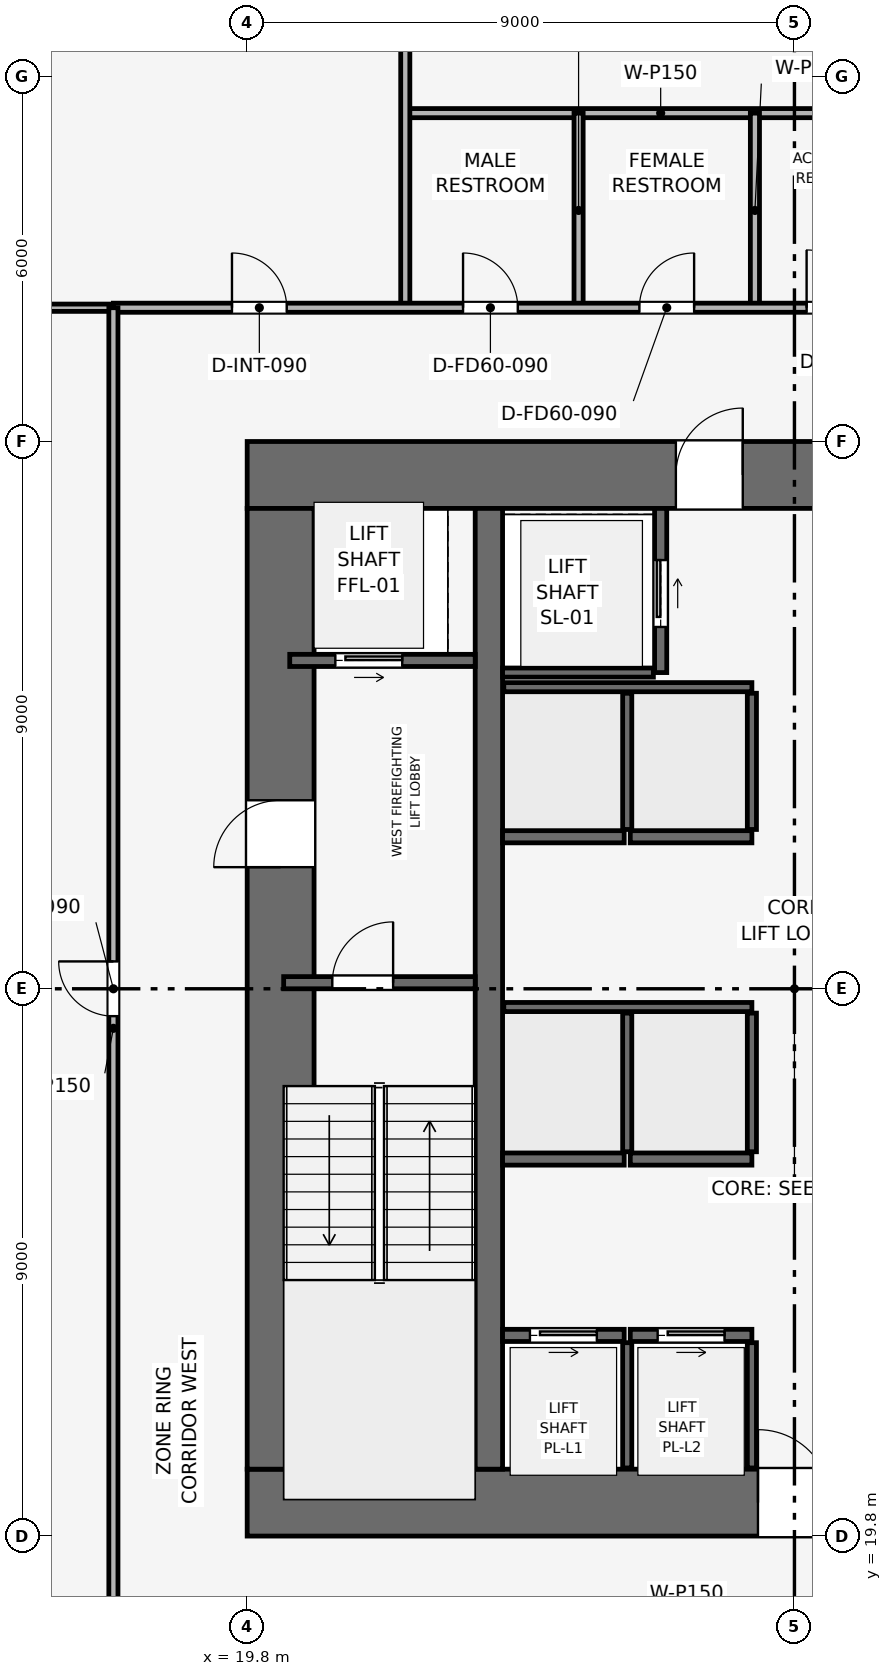
"""IFC4 building model, lengths in metres.
Left out: names, types, materials, properties, quantities, classifications, styles, units other than length and angle.
Written with IfcOpenShell. Run it as: python <this file> out.ifc"""

import sys

from ifc_helpers import new_model, si_unit, direction, frame, frame_2d, origin, place, context, subcontext, project, spatial, rectangle, extrude, element, fill, save


model = new_model("IFC4")
c1 = context("Model", 3, precision=1e-05, world=origin(), true_north=direction((0.0, 1.0)))
c2 = subcontext(c1, "Body", "Model", "MODEL_VIEW")
j1 = project(units=[si_unit("LENGTHUNIT", "METRE"), si_unit("PLANEANGLEUNIT", "RADIAN")], contexts=[c1])
p1 = place(None, origin())
s1 = spatial("IfcSite", under=j1, at=p1, CompositionType="ELEMENT")
p2 = place(p1, origin())
s2 = spatial("IfcBuilding", under=s1, at=p2, CompositionType="ELEMENT")
p3 = place(p2, frame((0.0, 0.0, 41.7)))
s3 = spatial("IfcBuildingStorey", under=s2, at=p3, CompositionType="ELEMENT", Elevation=41.7)
p4 = place(p3, frame((19.8, 20.35, 0.0), z_axis=(0.0, 0.0, 1.0), x_axis=(1.0, 0.0, 0.0)))
e1 = element("IfcWall", 1, at=p4, inside=s3, PredefinedType="SHEAR", context=c2, shape_type="SweptSolid", body=[
    extrude(rectangle(XDim=18.0, YDim=1.1, at=frame_2d((9.0, 0.0))), origin(), (0.0, 0.0, 1.0), 3.9),
])
p5 = place(p4, frame((8.4, 0.0, 0.0)))
e2 = element("IfcOpeningElement", 2, at=p5, cuts=e1, PredefinedType="OPENING", context=c2, shape_type="SweptSolid", body=[
    extrude(rectangle(XDim=1.2, YDim=2.2, at=frame_2d((0.6, 1.1))), frame((0.0, 0.56, 0.0), z_axis=(0.0, -1.0, 0.0), x_axis=(1.0, 0.0, 0.0)), (0.0, 0.0, 1.0), 1.12),
])
p6 = place(p3, frame((19.8, 37.25, 0.0), z_axis=(0.0, 0.0, 1.0), x_axis=(1.0, 0.0, 0.0)))
e3 = element("IfcWall", 3, at=p6, inside=s3, PredefinedType="SHEAR", context=c2, shape_type="SweptSolid", body=[
    extrude(rectangle(XDim=18.0, YDim=1.1, at=frame_2d((9.0, 0.0))), origin(), (0.0, 0.0, 1.0), 3.9),
])
p7 = place(p6, frame((7.05, 0.0, 0.0)))
e4 = element("IfcOpeningElement", 4, at=p7, cuts=e3, PredefinedType="OPENING", context=c2, shape_type="SweptSolid", body=[
    extrude(rectangle(XDim=1.1, YDim=2.15, at=frame_2d((0.55, 1.075))), frame((0.0, 0.56, 0.0), z_axis=(0.0, -1.0, 0.0), x_axis=(1.0, 0.0, 0.0)), (0.0, 0.0, 1.0), 1.12),
])
p8 = place(p3, frame((20.35, 20.9, 0.0), z_axis=(0.0, 0.0, 1.0), x_axis=(0.0, 1.0, 0.0)))
e5 = element("IfcWall", 5, at=p8, inside=s3, PredefinedType="SHEAR", context=c2, shape_type="SweptSolid", body=[
    extrude(rectangle(XDim=15.8, YDim=1.1, at=frame_2d((7.9, 0.0))), origin(), (0.0, 0.0, 1.0), 3.9),
])
p9 = place(p8, frame((9.9, 0.0, 0.0)))
e6 = element("IfcOpeningElement", 6, at=p9, cuts=e5, PredefinedType="OPENING", context=c2, shape_type="SweptSolid", body=[
    extrude(rectangle(XDim=1.1, YDim=2.15, at=frame_2d((0.55, 1.075))), frame((0.0, 0.56, 0.0), z_axis=(0.0, -1.0, 0.0), x_axis=(1.0, 0.0, 0.0)), (0.0, 0.0, 1.0), 1.12),
])
p10 = place(p3, frame((23.775, 20.9, 0.0), z_axis=(0.0, 0.0, 1.0), x_axis=(0.0, 1.0, 0.0)))
e7 = element("IfcWall", 7, at=p10, inside=s3, PredefinedType="SHEAR", context=c2, shape_type="SweptSolid", body=[
    extrude(rectangle(XDim=15.8, YDim=0.45, at=frame_2d((7.9, 0.0))), origin(), (0.0, 0.0, 1.0), 3.9),
])
p11 = place(p3, frame((20.4, 28.9, 0.0), z_axis=(0.0, 0.0, 1.0), x_axis=(1.0, 0.0, 0.0)))
e8 = element("IfcWall", 8, at=p11, inside=s3, PredefinedType="SHEAR", context=c2, shape_type="SweptSolid", body=[
    extrude(rectangle(XDim=3.15, YDim=0.2, at=frame_2d((1.575, 0.0))), origin(), (0.0, 0.0, 1.0), 3.65),
])
p12 = place(p11, frame((0.8, 0.0, 0.0)))
e9 = element("IfcOpeningElement", 9, at=p12, cuts=e8, PredefinedType="OPENING", context=c2, shape_type="SweptSolid", body=[
    extrude(rectangle(XDim=1.0, YDim=2.1, at=frame_2d((0.5, 1.05))), frame((0.0, 0.11, 0.0), z_axis=(0.0, -1.0, 0.0), x_axis=(1.0, 0.0, 0.0)), (0.0, 0.0, 1.0), 0.22),
])
p13 = place(p3, frame((20.5, 34.2, 0.0), z_axis=(0.0, 0.0, 1.0), x_axis=(1.0, 0.0, 0.0)))
e10 = element("IfcWall", 10, at=p13, inside=s3, PredefinedType="SHEAR", context=c2, shape_type="SweptSolid", body=[
    extrude(rectangle(XDim=3.05, YDim=0.2, at=frame_2d((1.525, 0.0))), origin(), (0.0, 0.0, 1.0), 3.65),
])
p14 = place(p13, frame((0.75, 0.0, 0.0)))
e11 = element("IfcOpeningElement", 11, at=p14, cuts=e10, PredefinedType="OPENING", context=c2, shape_type="SweptSolid", body=[
    extrude(rectangle(XDim=1.1, YDim=2.15, at=frame_2d((0.55, 1.075))), frame((0.0, 0.11, 0.0), z_axis=(0.0, -1.0, 0.0), x_axis=(1.0, 0.0, 0.0)), (0.0, 0.0, 1.0), 0.22),
])
p15 = place(p3, frame((26.6, 34.0, 0.0), z_axis=(0.0, 0.0, 1.0), x_axis=(0.0, 1.0, 0.0)))
e12 = element("IfcWall", 12, at=p15, inside=s3, PredefinedType="SHEAR", context=c2, shape_type="SweptSolid", body=[
    extrude(rectangle(XDim=2.7, YDim=0.2, at=frame_2d((1.35, 0.0))), origin(), (0.0, 0.0, 1.0), 3.65),
])
p16 = place(p15, frame((0.75, 0.0, 0.0)))
e13 = element("IfcOpeningElement", 13, at=p16, cuts=e12, PredefinedType="OPENING", context=c2, shape_type="SweptSolid", body=[
    extrude(rectangle(XDim=1.1, YDim=2.15, at=frame_2d((0.55, 1.075))), frame((0.0, 0.11, 0.0), z_axis=(0.0, -1.0, 0.0), x_axis=(1.0, 0.0, 0.0)), (0.0, 0.0, 1.0), 0.22),
])
p17 = place(p3, frame((24.0, 34.0, 0.0), z_axis=(0.0, 0.0, 1.0), x_axis=(1.0, 0.0, 0.0)))
e14 = element("IfcWall", 14, at=p17, inside=s3, PredefinedType="SHEAR", context=c2, shape_type="SweptSolid", body=[
    extrude(rectangle(XDim=2.48, YDim=0.15, at=frame_2d((1.24, 0.0))), origin(), (0.0, 0.0, 1.0), 3.65),
])
p18 = place(p3, frame((24.0, 23.1, 0.0), z_axis=(0.0, 0.0, 1.0), x_axis=(1.0, 0.0, 0.0)))
e15 = element("IfcWall", 15, at=p18, inside=s3, PredefinedType="SHEAR", context=c2, shape_type="SweptSolid", body=[
    extrude(rectangle(XDim=2.0, YDim=0.2, at=frame_2d((1.0, 0.0))), origin(), (0.0, 0.0, 1.0), 3.65),
])
p19 = place(p18, frame((0.45, 0.0, 0.0)))
e16 = element("IfcOpeningElement", 16, at=p19, cuts=e15, PredefinedType="OPENING", context=c2, shape_type="SweptSolid", body=[
    extrude(rectangle(XDim=1.1, YDim=2.15, at=frame_2d((0.55, 1.075))), frame((0.0, 0.11, 0.0), z_axis=(0.0, -1.0, 0.0), x_axis=(1.0, 0.0, 0.0)), (0.0, 0.0, 1.0), 0.22),
])
p20 = place(p3, frame((26.1, 23.1, 0.0), z_axis=(0.0, 0.0, 1.0), x_axis=(1.0, 0.0, 0.0)))
e17 = element("IfcWall", 17, at=p20, inside=s3, PredefinedType="SHEAR", context=c2, shape_type="SweptSolid", body=[
    extrude(rectangle(XDim=2.0, YDim=0.2, at=frame_2d((1.0, 0.0))), origin(), (0.0, 0.0, 1.0), 3.65),
])
p21 = place(p20, frame((0.45, 0.0, 0.0)))
e18 = element("IfcOpeningElement", 18, at=p21, cuts=e17, PredefinedType="OPENING", context=c2, shape_type="SweptSolid", body=[
    extrude(rectangle(XDim=1.1, YDim=2.15, at=frame_2d((0.55, 1.075))), frame((0.0, 0.11, 0.0), z_axis=(0.0, -1.0, 0.0), x_axis=(1.0, 0.0, 0.0)), (0.0, 0.0, 1.0), 0.22),
])
for number, where, z_axis, x_axis in (
    (19, (24.0, 26.0, 0.0), (0.0, 0.0, 1.0), (1.0, 0.0, 0.0)),
    (20, (26.1, 26.0, 0.0), (0.0, 0.0, 1.0), (1.0, 0.0, 0.0)),
    (21, (24.0, 31.3, 0.0), (0.0, 0.0, 1.0), (1.0, 0.0, 0.0)),
    (22, (26.1, 31.3, 0.0), (0.0, 0.0, 1.0), (1.0, 0.0, 0.0)),
):
    element("IfcWall", number, at=place(p3, frame(where, z_axis=z_axis, x_axis=x_axis)), inside=s3, PredefinedType="SHEAR", context=c2, shape_type="SweptSolid", body=[
        extrude(rectangle(XDim=2.0, YDim=0.2, at=frame_2d((1.0, 0.0))), origin(), (0.0, 0.0, 1.0), 3.65),
    ])
for number, where, z_axis, x_axis in (
    (23, (26.05, 20.92, 0.0), (0.0, 0.0, 1.0), (0.0, 1.0, 0.0)),
    (24, (28.1, 20.92, 0.0), (0.0, 0.0, 1.0), (0.0, 1.0, 0.0)),
):
    element("IfcWall", number, at=place(p3, frame(where, z_axis=z_axis, x_axis=x_axis)), inside=s3, PredefinedType="SHEAR", context=c2, shape_type="SweptSolid", body=[
        extrude(rectangle(XDim=2.06, YDim=0.15, at=frame_2d((1.03, 0.0))), origin(), (0.0, 0.0, 1.0), 3.65),
    ])
p22 = place(p3, frame((24.02, 28.5, 0.0), z_axis=(0.0, 0.0, 1.0), x_axis=(1.0, 0.0, 0.0)))
e25 = element("IfcWall", 25, at=p22, inside=s3, PredefinedType="SHEAR", context=c2, shape_type="SweptSolid", body=[
    extrude(rectangle(XDim=4.08, YDim=0.15, at=frame_2d((2.04, 0.0))), origin(), (0.0, 0.0, 1.0), 3.65),
])
for number, where, z_axis, x_axis in (
    (26, (26.05, 26.12, 0.0), (0.0, 0.0, 1.0), (0.0, 1.0, 0.0)),
    (27, (28.1, 26.12, 0.0), (0.0, 0.0, 1.0), (0.0, 1.0, 0.0)),
):
    element("IfcWall", number, at=place(p3, frame(where, z_axis=z_axis, x_axis=x_axis)), inside=s3, PredefinedType="SHEAR", context=c2, shape_type="SweptSolid", body=[
        extrude(rectangle(XDim=2.28, YDim=0.15, at=frame_2d((1.14, 0.0))), origin(), (0.0, 0.0, 1.0), 3.65),
    ])
p23 = place(p3, frame((24.02, 33.76, 0.0), z_axis=(0.0, 0.0, 1.0), x_axis=(1.0, 0.0, 0.0)))
e28 = element("IfcWall", 28, at=p23, inside=s3, PredefinedType="SHEAR", context=c2, shape_type="SweptSolid", body=[
    extrude(rectangle(XDim=4.08, YDim=0.15, at=frame_2d((2.04, 0.0))), origin(), (0.0, 0.0, 1.0), 3.65),
])
for number, where, z_axis, x_axis in (
    (29, (26.05, 31.42, 0.0), (0.0, 0.0, 1.0), (0.0, 1.0, 0.0)),
    (30, (28.1, 31.42, 0.0), (0.0, 0.0, 1.0), (0.0, 1.0, 0.0)),
):
    element("IfcWall", number, at=place(p3, frame(where, z_axis=z_axis, x_axis=x_axis)), inside=s3, PredefinedType="SHEAR", context=c2, shape_type="SweptSolid", body=[
        extrude(rectangle(XDim=2.24, YDim=0.15, at=frame_2d((1.12, 0.0))), origin(), (0.0, 0.0, 1.0), 3.65),
    ])
p24 = place(p3, frame((22.4, 43.2, 0.0), z_axis=(0.0, 0.0, 1.0), x_axis=(1.0, 0.0, 0.0)))
e31 = element("IfcWall", 31, at=p24, inside=s3, PredefinedType="PARTITIONING", context=c2, shape_type="SweptSolid", body=[
    extrude(rectangle(XDim=8.4, YDim=0.15, at=frame_2d((4.2, 0.0))), origin(), (0.0, 0.0, 1.0), 3.085),
])
p25 = place(p3, frame((22.4, 40.0, 0.0), z_axis=(0.0, 0.0, 1.0), x_axis=(0.0, 1.0, 0.0)))
e32 = element("IfcWall", 32, at=p25, inside=s3, PredefinedType="PARTITIONING", context=c2, shape_type="SweptSolid", body=[
    extrude(rectangle(XDim=16.57, YDim=0.15, at=frame_2d((8.285, 0.0))), origin(), (0.0, 0.0, 1.0), 2.935),
])
p26 = place(p25, frame((9.435, 0.0, 0.0)))
e33 = element("IfcOpeningElement", 33, at=p26, cuts=e32, PredefinedType="OPENING", context=c2, shape_type="SweptSolid", body=[
    extrude(rectangle(XDim=0.9, YDim=2.1, at=frame_2d((0.45, 1.05))), frame((0.0, 0.085, 0.0), z_axis=(0.0, -1.0, 0.0), x_axis=(1.0, 0.0, 0.0)), (0.0, 0.0, 1.0), 0.17),
])
for number, where, z_axis, x_axis in (
    (34, (25.25, 40.0, 0.0), (0.0, 0.0, 1.0), (0.0, 1.0, 0.0)),
    (35, (28.15, 40.0, 0.0), (0.0, 0.0, 1.0), (0.0, 1.0, 0.0)),
):
    element("IfcWall", number, at=place(p3, frame(where, z_axis=z_axis, x_axis=x_axis)), inside=s3, PredefinedType="PARTITIONING", context=c2, shape_type="SweptSolid", body=[
        extrude(rectangle(XDim=3.2, YDim=0.15, at=frame_2d((1.6, 0.0))), origin(), (0.0, 0.0, 1.0), 3.65),
    ])
p27 = place(p3, frame((1.03, 40.0, 0.0), z_axis=(0.0, 0.0, 1.0), x_axis=(1.0, 0.0, 0.0)))
e36 = element("IfcWall", 36, at=p27, inside=s3, PredefinedType="PARTITIONING", context=c2, shape_type="SweptSolid", body=[
    extrude(rectangle(XDim=16.57, YDim=0.12, at=frame_2d((8.285, 0.0))), origin(), (0.0, 0.0, 1.0), 2.935),
])
p28 = place(p3, frame((17.6, 40.0, 0.0), z_axis=(0.0, 0.0, 1.0), x_axis=(1.0, 0.0, 0.0)))
e37 = element("IfcWall", 37, at=p28, inside=s3, PredefinedType="PARTITIONING", context=c2, shape_type="SweptSolid", body=[
    extrude(rectangle(XDim=22.4, YDim=0.15, at=frame_2d((11.2, 0.0))), origin(), (0.0, 0.0, 1.0), 3.085),
])
p29 = place(p28, frame((1.95, 0.0, 0.0)))
e38 = element("IfcOpeningElement", 38, at=p29, cuts=e37, PredefinedType="OPENING", context=c2, shape_type="SweptSolid", body=[
    extrude(rectangle(XDim=0.9, YDim=2.1, at=frame_2d((0.45, 1.05))), frame((0.0, 0.085, 0.0), z_axis=(0.0, -1.0, 0.0), x_axis=(1.0, 0.0, 0.0)), (0.0, 0.0, 1.0), 0.17),
])
p30 = place(p28, frame((5.75, 0.0, 0.0)))
e39 = element("IfcOpeningElement", 39, at=p30, cuts=e37, PredefinedType="OPENING", context=c2, shape_type="SweptSolid", body=[
    extrude(rectangle(XDim=0.9, YDim=2.1, at=frame_2d((0.45, 1.05))), frame((0.0, 0.085, 0.0), z_axis=(0.0, -1.0, 0.0), x_axis=(1.0, 0.0, 0.0)), (0.0, 0.0, 1.0), 0.17),
])
p31 = place(p28, frame((8.65, 0.0, 0.0)))
e40 = element("IfcOpeningElement", 40, at=p31, cuts=e37, PredefinedType="OPENING", context=c2, shape_type="SweptSolid", body=[
    extrude(rectangle(XDim=0.9, YDim=2.1, at=frame_2d((0.45, 1.05))), frame((0.0, 0.085, 0.0), z_axis=(0.0, -1.0, 0.0), x_axis=(1.0, 0.0, 0.0)), (0.0, 0.0, 1.0), 0.17),
])
p32 = place(p28, frame((11.4, 0.0, 0.0)))
e41 = element("IfcOpeningElement", 41, at=p32, cuts=e37, PredefinedType="OPENING", context=c2, shape_type="SweptSolid", body=[
    extrude(rectangle(XDim=0.95, YDim=2.1, at=frame_2d((0.475, 1.05))), frame((0.0, 0.085, 0.0), z_axis=(0.0, -1.0, 0.0), x_axis=(1.0, 0.0, 0.0)), (0.0, 0.0, 1.0), 0.17),
])
p33 = place(p28, frame((17.35, 0.0, 0.0)))
e42 = element("IfcOpeningElement", 42, at=p33, cuts=e37, PredefinedType="OPENING", context=c2, shape_type="SweptSolid", body=[
    extrude(rectangle(XDim=0.9, YDim=2.1, at=frame_2d((0.45, 1.05))), frame((0.0, 0.085, 0.0), z_axis=(0.0, -1.0, 0.0), x_axis=(1.0, 0.0, 0.0)), (0.0, 0.0, 1.0), 0.17),
])
p34 = place(p3, frame((17.6, 17.6, 0.0), z_axis=(0.0, 0.0, 1.0), x_axis=(0.0, 1.0, 0.0)))
e43 = element("IfcWall", 43, at=p34, inside=s3, PredefinedType="PARTITIONING", context=c2, shape_type="SweptSolid", body=[
    extrude(rectangle(XDim=22.4, YDim=0.15, at=frame_2d((11.2, 0.0))), origin(), (0.0, 0.0, 1.0), 3.085),
])
p35 = place(p34, frame((10.75, 0.0, 0.0)))
e44 = element("IfcOpeningElement", 44, at=p35, cuts=e43, PredefinedType="OPENING", context=c2, shape_type="SweptSolid", body=[
    extrude(rectangle(XDim=0.9, YDim=2.1, at=frame_2d((0.45, 1.05))), frame((0.0, 0.085, 0.0), z_axis=(0.0, -1.0, 0.0), x_axis=(1.0, 0.0, 0.0)), (0.0, 0.0, 1.0), 0.17),
])
p36 = place(p12, origin())
e45 = element("IfcDoor", 45, at=p36, inside=s3, OperationType="SINGLE_SWING_RIGHT", PredefinedType="DOOR", context=c2, shape_type="SweptSolid", body=[
    extrude(rectangle(XDim=1.0, YDim=2.1, at=frame_2d((0.5, 1.05))), frame((0.0, 0.025, 0.0), z_axis=(0.0, -1.0, 0.0), x_axis=(1.0, 0.0, 0.0)), (0.0, 0.0, 1.0), 0.05),
])
fill(e9, e45)
p37 = place(p14, origin())
e46 = element("IfcDoor", 46, at=p37, inside=s3, OperationType="SLIDING_TO_RIGHT", PredefinedType="DOOR", context=c2, shape_type="SweptSolid", body=[
    extrude(rectangle(XDim=1.1, YDim=2.15, at=frame_2d((0.55, 1.075))), frame((0.0, 0.025, 0.0), z_axis=(0.0, -1.0, 0.0), x_axis=(1.0, 0.0, 0.0)), (0.0, 0.0, 1.0), 0.05),
])
fill(e11, e46)
p38 = place(p16, origin())
e47 = element("IfcDoor", 47, at=p38, inside=s3, OperationType="SLIDING_TO_RIGHT", PredefinedType="DOOR", context=c2, shape_type="SweptSolid", body=[
    extrude(rectangle(XDim=1.1, YDim=2.15, at=frame_2d((0.55, 1.075))), frame((0.0, 0.025, 0.0), z_axis=(0.0, -1.0, 0.0), x_axis=(1.0, 0.0, 0.0)), (0.0, 0.0, 1.0), 0.05),
])
fill(e13, e47)
p39 = place(p19, origin())
e48 = element("IfcDoor", 48, at=p39, inside=s3, OperationType="SLIDING_TO_RIGHT", PredefinedType="DOOR", context=c2, shape_type="SweptSolid", body=[
    extrude(rectangle(XDim=1.1, YDim=2.15, at=frame_2d((0.55, 1.075))), frame((0.0, 0.025, 0.0), z_axis=(0.0, -1.0, 0.0), x_axis=(1.0, 0.0, 0.0)), (0.0, 0.0, 1.0), 0.05),
])
fill(e16, e48)
p40 = place(p21, origin())
e49 = element("IfcDoor", 49, at=p40, inside=s3, OperationType="SLIDING_TO_RIGHT", PredefinedType="DOOR", context=c2, shape_type="SweptSolid", body=[
    extrude(rectangle(XDim=1.1, YDim=2.15, at=frame_2d((0.55, 1.075))), frame((0.0, 0.025, 0.0), z_axis=(0.0, -1.0, 0.0), x_axis=(1.0, 0.0, 0.0)), (0.0, 0.0, 1.0), 0.05),
])
fill(e18, e49)
p41 = place(p29, origin())
e50 = element("IfcDoor", 50, at=p41, inside=s3, OperationType="SINGLE_SWING_LEFT", PredefinedType="DOOR", context=c2, shape_type="SweptSolid", body=[
    extrude(rectangle(XDim=0.9, YDim=2.1, at=frame_2d((0.45, 1.05))), frame((0.0, 0.025, 0.0), z_axis=(0.0, -1.0, 0.0), x_axis=(1.0, 0.0, 0.0)), (0.0, 0.0, 1.0), 0.05),
])
fill(e38, e50)
p42 = place(p30, origin())
e51 = element("IfcDoor", 51, at=p42, inside=s3, OperationType="SINGLE_SWING_LEFT", PredefinedType="DOOR", context=c2, shape_type="SweptSolid", body=[
    extrude(rectangle(XDim=0.9, YDim=2.1, at=frame_2d((0.45, 1.05))), frame((0.0, 0.025, 0.0), z_axis=(0.0, -1.0, 0.0), x_axis=(1.0, 0.0, 0.0)), (0.0, 0.0, 1.0), 0.05),
])
fill(e39, e51)
p43 = place(p31, origin())
e52 = element("IfcDoor", 52, at=p43, inside=s3, OperationType="SINGLE_SWING_RIGHT", PredefinedType="DOOR", context=c2, shape_type="SweptSolid", body=[
    extrude(rectangle(XDim=0.9, YDim=2.1, at=frame_2d((0.45, 1.05))), frame((0.0, 0.025, 0.0), z_axis=(0.0, -1.0, 0.0), x_axis=(1.0, 0.0, 0.0)), (0.0, 0.0, 1.0), 0.05),
])
fill(e40, e52)
p44 = place(p32, origin())
e53 = element("IfcDoor", 53, at=p44, inside=s3, OperationType="SINGLE_SWING_LEFT", PredefinedType="DOOR", context=c2, shape_type="SweptSolid", body=[
    extrude(rectangle(XDim=0.95, YDim=2.1, at=frame_2d((0.475, 1.05))), frame((0.0, 0.025, 0.0), z_axis=(0.0, -1.0, 0.0), x_axis=(1.0, 0.0, 0.0)), (0.0, 0.0, 1.0), 0.05),
])
fill(e41, e53)
p45 = place(p35, origin())
e54 = element("IfcDoor", 54, at=p45, inside=s3, OperationType="SINGLE_SWING_RIGHT", PredefinedType="DOOR", context=c2, shape_type="SweptSolid", body=[
    extrude(rectangle(XDim=0.9, YDim=2.1, at=frame_2d((0.45, 1.05))), frame((0.0, 0.025, 0.0), z_axis=(0.0, -1.0, 0.0), x_axis=(1.0, 0.0, 0.0)), (0.0, 0.0, 1.0), 0.05),
])
fill(e44, e54)
p46 = place(p9, origin())
e55 = element("IfcDoor", 55, at=p46, inside=s3, OperationType="SINGLE_SWING_LEFT", PredefinedType="DOOR", context=c2, shape_type="SweptSolid", body=[
    extrude(rectangle(XDim=1.1, YDim=2.15, at=frame_2d((0.55, 1.075))), frame((0.0, 0.025, 0.0), z_axis=(0.0, -1.0, 0.0), x_axis=(1.0, 0.0, 0.0)), (0.0, 0.0, 1.0), 0.05),
])
fill(e6, e55)
p47 = place(p5, origin())
e56 = element("IfcDoor", 56, at=p47, inside=s3, OperationType="SINGLE_SWING_LEFT", PredefinedType="DOOR", context=c2, shape_type="SweptSolid", body=[
    extrude(rectangle(XDim=1.2, YDim=2.2, at=frame_2d((0.6, 1.1))), frame((0.0, 0.025, 0.0), z_axis=(0.0, -1.0, 0.0), x_axis=(1.0, 0.0, 0.0)), (0.0, 0.0, 1.0), 0.05),
])
fill(e2, e56)
p48 = place(p7, origin())
e57 = element("IfcDoor", 57, at=p48, inside=s3, OperationType="SINGLE_SWING_RIGHT", PredefinedType="DOOR", context=c2, shape_type="SweptSolid", body=[
    extrude(rectangle(XDim=1.1, YDim=2.15, at=frame_2d((0.55, 1.075))), frame((0.0, 0.025, 0.0), z_axis=(0.0, -1.0, 0.0), x_axis=(1.0, 0.0, 0.0)), (0.0, 0.0, 1.0), 0.05),
])
fill(e4, e57)
save(model, sys.argv[1])
